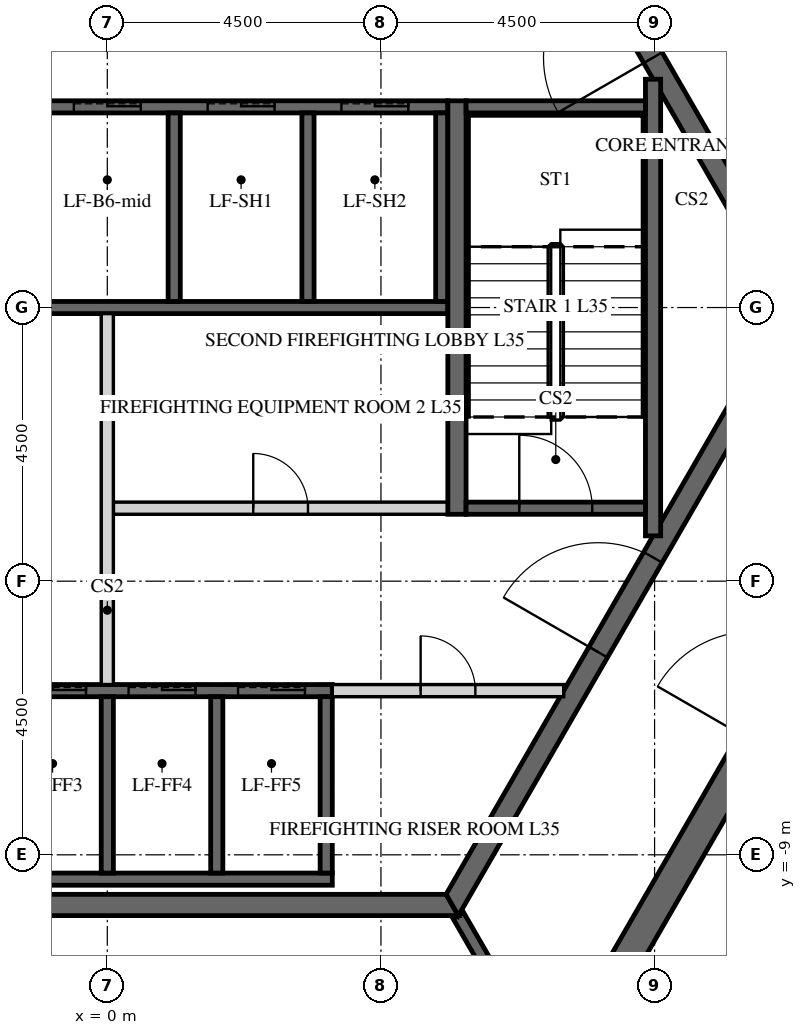
"""IFC4 building model, lengths in metres.
Left out: names, types, materials, properties, quantities, classifications, styles, units other than length and angle.
Written with IfcOpenShell. Run it as: python <this file> out.ifc"""

import sys

from ifc_helpers import new_model, si_unit, direction, frame, frame_2d, origin, place, context, subcontext, project, spatial, polyline, rectangle, outline, extrude, element, fill, save


model = new_model("IFC4")
c1 = context("Model", 3, precision=1e-05, world=origin(), true_north=direction((0.0, 1.0)))
c2 = subcontext(c1, "Body", "Model", "MODEL_VIEW")
j1 = project(units=[si_unit("LENGTHUNIT", "METRE"), si_unit("PLANEANGLEUNIT", "RADIAN")], contexts=[c1])
p1 = place(None, origin())
s1 = spatial("IfcSite", under=j1, at=p1, CompositionType="ELEMENT")
p2 = place(p1, origin())
s2 = spatial("IfcBuilding", under=s1, at=p2, CompositionType="ELEMENT")
p3 = place(p2, frame((0.0, 0.0, 152.7)))
s3 = spatial("IfcBuildingStorey", under=s2, at=p3, CompositionType="ELEMENT", Elevation=152.7)
p4 = place(p3, frame((7.361, -12.75, 0.0), z_axis=(0.0, 0.0, 1.0), x_axis=(0.50000571537, 0.866022103989, 0.0)))
e1 = element("IfcWall", 1, at=p4, inside=s3, PredefinedType="SHEAR", context=c2, shape_type="SweptSolid", body=[
    extrude(outline(polyline([(-0.144, -0.25), (14.867, -0.25), (14.578, 0.25), (0.144, 0.25), (-0.144, -0.25)])), origin(), (0.0, 0.0, 1.0), 3.75),
])
p5 = place(p4, frame((6.49, 0.0, 0.0)))
e2 = element("IfcOpeningElement", 2, at=p5, cuts=e1, PredefinedType="OPENING", context=c2, shape_type="SweptSolid", body=[
    extrude(rectangle(XDim=1.8, YDim=2.4, at=frame_2d((0.9, 1.2))), frame((0.0, 0.26, 0.0), z_axis=(0.0, -1.0, 0.0), x_axis=(1.0, 0.0, 0.0)), (0.0, 0.0, 1.0), 0.52),
])
p6 = place(p3, frame((14.722, 0.0, 0.0), z_axis=(0.0, 0.0, 1.0), x_axis=(-0.50000571537, 0.866022103989, 0.0)))
e3 = element("IfcWall", 3, at=p6, inside=s3, PredefinedType="SHEAR", context=c2, shape_type="SweptSolid", body=[
    extrude(outline(polyline([(-0.144, -0.25), (14.867, -0.25), (14.578, 0.25), (0.144, 0.25), (-0.144, -0.25)])), origin(), (0.0, 0.0, 1.0), 3.75),
])
p7 = place(p6, frame((6.432, 0.0, 0.0)))
e4 = element("IfcOpeningElement", 4, at=p7, cuts=e3, PredefinedType="OPENING", context=c2, shape_type="SweptSolid", body=[
    extrude(rectangle(XDim=1.8, YDim=2.4, at=frame_2d((0.9, 1.2))), frame((0.0, 0.26, 0.0), z_axis=(0.0, -1.0, 0.0), x_axis=(1.0, 0.0, 0.0)), (0.0, 0.0, 1.0), 0.52),
])
p8 = place(p3, frame((-5.673, -9.825, 0.0), z_axis=(0.0, 0.0, 1.0), x_axis=(1.0, 0.0, 0.0)))
e5 = element("IfcWall", 5, at=p8, inside=s3, PredefinedType="SHEAR", context=c2, shape_type="SweptSolid", body=[
    extrude(outline(polyline([(-0.101, -0.175), (11.446, -0.175), (11.244, 0.175), (0.101, 0.175), (-0.101, -0.175)])), origin(), (0.0, 0.0, 1.0), 3.75),
])
p9 = place(p3, frame((5.673, -9.825, 0.0), z_axis=(0.0, 0.0, 1.0), x_axis=(0.499995046907, 0.866028263435, 0.0)))
e6 = element("IfcWall", 6, at=p9, inside=s3, PredefinedType="SHEAR", context=c2, shape_type="SweptSolid", body=[
    extrude(outline(polyline([(-0.101, -0.175), (11.446, -0.175), (11.244, 0.175), (0.101, 0.175), (-0.101, -0.175)])), origin(), (0.0, 0.0, 1.0), 3.75),
])
p10 = place(p9, frame((4.801, 0.0, 0.0)))
e7 = element("IfcOpeningElement", 7, at=p10, cuts=e6, PredefinedType="OPENING", context=c2, shape_type="SweptSolid", body=[
    extrude(rectangle(XDim=1.8, YDim=2.4, at=frame_2d((0.9, 1.2))), frame((0.0, 0.185, 0.0), z_axis=(0.0, -1.0, 0.0), x_axis=(1.0, 0.0, 0.0)), (0.0, 0.0, 1.0), 0.37),
])
p11 = place(p3, frame((11.345, 0.0, 0.0), z_axis=(0.0, 0.0, 1.0), x_axis=(-0.499995046907, 0.866028263435, 0.0)))
e8 = element("IfcWall", 8, at=p11, inside=s3, PredefinedType="SHEAR", context=c2, shape_type="SweptSolid", body=[
    extrude(outline(polyline([(-0.101, -0.175), (11.446, -0.175), (11.244, 0.175), (0.101, 0.175), (-0.101, -0.175)])), origin(), (0.0, 0.0, 1.0), 3.75),
])
p12 = place(p11, frame((4.744, 0.0, 0.0)))
e9 = element("IfcOpeningElement", 9, at=p12, cuts=e8, PredefinedType="OPENING", context=c2, shape_type="SweptSolid", body=[
    extrude(rectangle(XDim=1.8, YDim=2.4, at=frame_2d((0.9, 1.2))), frame((0.0, 0.185, 0.0), z_axis=(0.0, -1.0, 0.0), x_axis=(1.0, 0.0, 0.0)), (0.0, 0.0, 1.0), 0.37),
])
p13 = place(p3, frame((-5.6, 3.3, -0.5), z_axis=(0.0, 0.0, 1.0), x_axis=(1.0, 0.0, 0.0)))
e10 = element("IfcWall", 10, at=p13, inside=s3, PredefinedType="SHEAR", context=c2, shape_type="SweptSolid", body=[
    extrude(rectangle(XDim=11.2, YDim=0.2, at=frame_2d((5.6, 0.0))), origin(), (0.0, 0.0, 1.0), 4.15),
])
p14 = place(p13, frame((0.65, 0.0, 0.5)))
e11 = element("IfcOpeningElement", 11, at=p14, cuts=e10, PredefinedType="OPENING", context=c2, shape_type="SweptSolid", body=[
    extrude(rectangle(XDim=1.1, YDim=2.1, at=frame_2d((0.55, 1.05))), frame((0.0, 0.11, 0.0), z_axis=(0.0, -1.0, 0.0), x_axis=(1.0, 0.0, 0.0)), (0.0, 0.0, 1.0), 0.22),
])
p15 = place(p13, frame((2.85, 0.0, 0.5)))
e12 = element("IfcOpeningElement", 12, at=p15, cuts=e10, PredefinedType="OPENING", context=c2, shape_type="SweptSolid", body=[
    extrude(rectangle(XDim=1.1, YDim=2.1, at=frame_2d((0.55, 1.05))), frame((0.0, 0.11, 0.0), z_axis=(0.0, -1.0, 0.0), x_axis=(1.0, 0.0, 0.0)), (0.0, 0.0, 1.0), 0.22),
])
p16 = place(p13, frame((5.05, 0.0, 0.5)))
e13 = element("IfcOpeningElement", 13, at=p16, cuts=e10, PredefinedType="OPENING", context=c2, shape_type="SweptSolid", body=[
    extrude(rectangle(XDim=1.1, YDim=2.1, at=frame_2d((0.55, 1.05))), frame((0.0, 0.11, 0.0), z_axis=(0.0, -1.0, 0.0), x_axis=(1.0, 0.0, 0.0)), (0.0, 0.0, 1.0), 0.22),
])
p17 = place(p13, frame((7.25, 0.0, 0.5)))
e14 = element("IfcOpeningElement", 14, at=p17, cuts=e10, PredefinedType="OPENING", context=c2, shape_type="SweptSolid", body=[
    extrude(rectangle(XDim=1.1, YDim=2.1, at=frame_2d((0.55, 1.05))), frame((0.0, 0.11, 0.0), z_axis=(0.0, -1.0, 0.0), x_axis=(1.0, 0.0, 0.0)), (0.0, 0.0, 1.0), 0.22),
])
p18 = place(p13, frame((9.45, 0.0, 0.5)))
e15 = element("IfcOpeningElement", 15, at=p18, cuts=e10, PredefinedType="OPENING", context=c2, shape_type="SweptSolid", body=[
    extrude(rectangle(XDim=1.1, YDim=2.1, at=frame_2d((0.55, 1.05))), frame((0.0, 0.11, 0.0), z_axis=(0.0, -1.0, 0.0), x_axis=(1.0, 0.0, 0.0)), (0.0, 0.0, 1.0), 0.22),
])
p19 = place(p3, frame((-5.6, 0.0, -0.5), z_axis=(0.0, 0.0, 1.0), x_axis=(1.0, 0.0, 0.0)))
e16 = element("IfcWall", 16, at=p19, inside=s3, PredefinedType="SHEAR", context=c2, shape_type="SweptSolid", body=[
    extrude(rectangle(XDim=11.2, YDim=0.2, at=frame_2d((5.6, 0.0))), origin(), (0.0, 0.0, 1.0), 4.15),
])
for number, where, z_axis, x_axis in (
    (17, (1.1, 0.1, -0.5), (0.0, 0.0, 1.0), (0.0, 1.0, 0.0)),
    (18, (3.3, 0.1, -0.5), (0.0, 0.0, 1.0), (0.0, 1.0, 0.0)),
    (19, (5.5, 0.1, -0.5), (0.0, 0.0, 1.0), (0.0, 1.0, 0.0)),
):
    element("IfcWall", number, at=place(p3, frame(where, z_axis=z_axis, x_axis=x_axis)), inside=s3, PredefinedType="SHEAR", context=c2, shape_type="SweptSolid", body=[
        extrude(rectangle(XDim=3.1, YDim=0.2, at=frame_2d((1.55, 0.0))), origin(), (0.0, 0.0, 1.0), 4.15),
    ])
p20 = place(p3, frame((-5.5, -6.3, -0.5), z_axis=(0.0, 0.0, 1.0), x_axis=(1.0, 0.0, 0.0)))
e20 = element("IfcWall", 20, at=p20, inside=s3, PredefinedType="SHEAR", context=c2, shape_type="SweptSolid", body=[
    extrude(rectangle(XDim=9.2, YDim=0.2, at=frame_2d((4.6, 0.0))), origin(), (0.0, 0.0, 1.0), 4.15),
])
p21 = place(p20, frame((0.45, 0.0, 0.5)))
e21 = element("IfcOpeningElement", 21, at=p21, cuts=e20, PredefinedType="OPENING", context=c2, shape_type="SweptSolid", body=[
    extrude(rectangle(XDim=1.1, YDim=2.1, at=frame_2d((0.55, 1.05))), frame((0.0, 0.11, 0.0), z_axis=(0.0, -1.0, 0.0), x_axis=(1.0, 0.0, 0.0)), (0.0, 0.0, 1.0), 0.22),
])
p22 = place(p20, frame((2.25, 0.0, 0.5)))
e22 = element("IfcOpeningElement", 22, at=p22, cuts=e20, PredefinedType="OPENING", context=c2, shape_type="SweptSolid", body=[
    extrude(rectangle(XDim=1.1, YDim=2.1, at=frame_2d((0.55, 1.05))), frame((0.0, 0.11, 0.0), z_axis=(0.0, -1.0, 0.0), x_axis=(1.0, 0.0, 0.0)), (0.0, 0.0, 1.0), 0.22),
])
p23 = place(p20, frame((4.05, 0.0, 0.5)))
e23 = element("IfcOpeningElement", 23, at=p23, cuts=e20, PredefinedType="OPENING", context=c2, shape_type="SweptSolid", body=[
    extrude(rectangle(XDim=1.1, YDim=2.1, at=frame_2d((0.55, 1.05))), frame((0.0, 0.11, 0.0), z_axis=(0.0, -1.0, 0.0), x_axis=(1.0, 0.0, 0.0)), (0.0, 0.0, 1.0), 0.22),
])
p24 = place(p20, frame((5.85, 0.0, 0.5)))
e24 = element("IfcOpeningElement", 24, at=p24, cuts=e20, PredefinedType="OPENING", context=c2, shape_type="SweptSolid", body=[
    extrude(rectangle(XDim=1.1, YDim=2.1, at=frame_2d((0.55, 1.05))), frame((0.0, 0.11, 0.0), z_axis=(0.0, -1.0, 0.0), x_axis=(1.0, 0.0, 0.0)), (0.0, 0.0, 1.0), 0.22),
])
p25 = place(p20, frame((7.65, 0.0, 0.5)))
e25 = element("IfcOpeningElement", 25, at=p25, cuts=e20, PredefinedType="OPENING", context=c2, shape_type="SweptSolid", body=[
    extrude(rectangle(XDim=1.1, YDim=2.1, at=frame_2d((0.55, 1.05))), frame((0.0, 0.11, 0.0), z_axis=(0.0, -1.0, 0.0), x_axis=(1.0, 0.0, 0.0)), (0.0, 0.0, 1.0), 0.22),
])
p26 = place(p3, frame((-5.5, -9.4, -0.5), z_axis=(0.0, 0.0, 1.0), x_axis=(1.0, 0.0, 0.0)))
e26 = element("IfcWall", 26, at=p26, inside=s3, PredefinedType="SHEAR", context=c2, shape_type="SweptSolid", body=[
    extrude(rectangle(XDim=9.2, YDim=0.2, at=frame_2d((4.6, 0.0))), origin(), (0.0, 0.0, 1.0), 4.15),
])
for number, where, z_axis, x_axis in (
    (27, (0.0, -9.3, -0.5), (0.0, 0.0, 1.0), (0.0, 1.0, 0.0)),
    (28, (1.8, -9.3, -0.5), (0.0, 0.0, 1.0), (0.0, 1.0, 0.0)),
    (29, (3.6, -9.3, -0.5), (0.0, 0.0, 1.0), (0.0, 1.0, 0.0)),
):
    element("IfcWall", number, at=place(p3, frame(where, z_axis=z_axis, x_axis=x_axis)), inside=s3, PredefinedType="SHEAR", context=c2, shape_type="SweptSolid", body=[
        extrude(rectangle(XDim=2.9, YDim=0.2, at=frame_2d((1.45, 0.0))), origin(), (0.0, 0.0, 1.0), 4.15),
    ])
p27 = place(p3, frame((0.1, -3.3, 0.0), z_axis=(0.0, 0.0, 1.0), x_axis=(1.0, 0.0, 0.0)))
e30 = element("IfcWall", 30, at=p27, inside=s3, PredefinedType="PARTITIONING", context=c2, shape_type="SweptSolid", body=[
    extrude(rectangle(XDim=5.5, YDim=0.2, at=frame_2d((2.75, 0.0))), origin(), (0.0, 0.0, 1.0), 3.65),
])
p28 = place(p27, frame((2.3, 0.0, 0.0)))
e31 = element("IfcOpeningElement", 31, at=p28, cuts=e30, PredefinedType="OPENING", context=c2, shape_type="SweptSolid", body=[
    extrude(rectangle(XDim=0.9, YDim=2.1, at=frame_2d((0.45, 1.05))), frame((0.0, 0.11, 0.0), z_axis=(0.0, -1.0, 0.0), x_axis=(1.0, 0.0, 0.0)), (0.0, 0.0, 1.0), 0.22),
])
p29 = place(p3, frame((0.0, -6.2, 0.0), z_axis=(0.0, 0.0, 1.0), x_axis=(0.0, 1.0, 0.0)))
e32 = element("IfcWall", 32, at=p29, inside=s3, PredefinedType="PARTITIONING", context=c2, shape_type="SweptSolid", body=[
    extrude(rectangle(XDim=6.1, YDim=0.2, at=frame_2d((3.05, 0.0))), origin(), (0.0, 0.0, 1.0), 3.65),
])
p30 = place(p3, frame((3.7, -6.3, 0.0), z_axis=(0.0, 0.0, 1.0), x_axis=(1.0, 0.0, 0.0)))
e33 = element("IfcWall", 33, at=p30, inside=s3, PredefinedType="PARTITIONING", context=c2, shape_type="SweptSolid", body=[
    extrude(rectangle(XDim=3.806, YDim=0.2, at=frame_2d((1.903, 0.0))), origin(), (0.0, 0.0, 1.0), 3.65),
])
p31 = place(p30, frame((1.453, 0.0, 0.0)))
e34 = element("IfcOpeningElement", 34, at=p31, cuts=e33, PredefinedType="OPENING", context=c2, shape_type="SweptSolid", body=[
    extrude(rectangle(XDim=0.9, YDim=2.1, at=frame_2d((0.45, 1.05))), frame((0.0, 0.11, 0.0), z_axis=(0.0, -1.0, 0.0), x_axis=(1.0, 0.0, 0.0)), (0.0, 0.0, 1.0), 0.22),
])
p32 = place(p3, frame((5.773, -10.0, 0.0), z_axis=(0.0, 0.0, 1.0), x_axis=(0.499995765644, -0.866027848477, 0.0)))
e35 = element("IfcWall", 35, at=p32, inside=s3, PredefinedType="SHEAR", context=c2, shape_type="SweptSolid", body=[
    extrude(rectangle(XDim=2.887, YDim=0.2, at=frame_2d((1.443, 0.0))), origin(), (0.0, 0.0, 1.0), 3.75),
])
p33 = place(p3, frame((5.75, -3.4, -0.5), z_axis=(0.0, 0.0, 1.0), x_axis=(0.0, 1.0, 0.0)))
e36 = element("IfcWall", 36, at=p33, inside=s3, PredefinedType="SHEAR", context=c2, shape_type="SweptSolid", body=[
    extrude(rectangle(XDim=6.8, YDim=0.3, at=frame_2d((3.4, 0.0))), origin(), (0.0, 0.0, 1.0), 4.15),
])
p34 = place(p3, frame((8.975, -3.755, -0.5), z_axis=(0.0, 0.0, 1.0), x_axis=(0.0, 1.0, 0.0)))
e37 = element("IfcWall", 37, at=p34, inside=s3, PredefinedType="SHEAR", context=c2, shape_type="SweptSolid", body=[
    extrude(rectangle(XDim=7.51, YDim=0.25, at=frame_2d((3.755, 0.0))), origin(), (0.0, 0.0, 1.0), 4.15),
])
p35 = place(p3, frame((5.9, 3.3, -0.5), z_axis=(0.0, 0.0, 1.0), x_axis=(1.0, 0.0, 0.0)))
e38 = element("IfcWall", 38, at=p35, inside=s3, PredefinedType="SHEAR", context=c2, shape_type="SweptSolid", body=[
    extrude(rectangle(XDim=2.95, YDim=0.2, at=frame_2d((1.475, 0.0))), origin(), (0.0, 0.0, 1.0), 4.15),
])
p36 = place(p3, frame((5.9, -3.3, -0.5), z_axis=(0.0, 0.0, 1.0), x_axis=(1.0, 0.0, 0.0)))
e39 = element("IfcWall", 39, at=p36, inside=s3, PredefinedType="SHEAR", context=c2, shape_type="SweptSolid", body=[
    extrude(rectangle(XDim=2.95, YDim=0.2, at=frame_2d((1.475, 0.0))), origin(), (0.0, 0.0, 1.0), 4.15),
])
p37 = place(p36, frame((0.875, 0.0, 0.5)))
e40 = element("IfcOpeningElement", 40, at=p37, cuts=e39, PredefinedType="OPENING", context=c2, shape_type="SweptSolid", body=[
    extrude(rectangle(XDim=1.2, YDim=2.4, at=frame_2d((0.6, 1.2))), frame((0.0, 0.11, 0.0), z_axis=(0.0, -1.0, 0.0), x_axis=(1.0, 0.0, 0.0)), (0.0, 0.0, 1.0), 0.22),
])
p38 = place(p3, frame((17.046, 0.075, 0.0), z_axis=(0.0, 0.0, 1.0), x_axis=(-0.499999403554, 0.866025748143, 0.0)))
e41 = element("IfcWall", 41, at=p38, inside=s3, PredefinedType="PARTITIONING", context=c2, shape_type="SweptSolid", body=[
    extrude(rectangle(XDim=14.549, YDim=0.15, at=frame_2d((7.275, 0.0))), origin(), (0.0, 0.0, 1.0), 2.823),
])
p39 = place(p38, frame((1.781, 0.0, 0.0)))
e42 = element("IfcOpeningElement", 42, at=p39, cuts=e41, PredefinedType="OPENING", context=c2, shape_type="SweptSolid", body=[
    extrude(rectangle(XDim=1.0, YDim=2.1, at=frame_2d((0.5, 1.05))), frame((0.0, 0.085, 0.0), z_axis=(0.0, -1.0, 0.0), x_axis=(1.0, 0.0, 0.0)), (0.0, 0.0, 1.0), 0.17),
])
p40 = place(p38, frame((8.705, 0.0, 0.0)))
e43 = element("IfcOpeningElement", 43, at=p40, cuts=e41, PredefinedType="OPENING", context=c2, shape_type="SweptSolid", body=[
    extrude(rectangle(XDim=1.0, YDim=2.1, at=frame_2d((0.5, 1.05))), frame((0.0, 0.085, 0.0), z_axis=(0.0, -1.0, 0.0), x_axis=(1.0, 0.0, 0.0)), (0.0, 0.0, 1.0), 0.17),
])
p41 = place(p12, origin())
e44 = element("IfcDoor", 44, at=p41, inside=s3, OperationType="DOUBLE_DOOR_SINGLE_SWING", PredefinedType="DOOR", context=c2, shape_type="SweptSolid", body=[
    extrude(rectangle(XDim=1.8, YDim=2.4, at=frame_2d((0.9, 1.2))), frame((0.0, 0.025, 0.0), z_axis=(0.0, -1.0, 0.0), x_axis=(1.0, 0.0, 0.0)), (0.0, 0.0, 1.0), 0.05),
])
fill(e9, e44)
p42 = place(p10, origin())
e45 = element("IfcDoor", 45, at=p42, inside=s3, OperationType="DOUBLE_DOOR_SINGLE_SWING", PredefinedType="DOOR", context=c2, shape_type="SweptSolid", body=[
    extrude(rectangle(XDim=1.8, YDim=2.4, at=frame_2d((0.9, 1.2))), frame((0.0, 0.025, 0.0), z_axis=(0.0, -1.0, 0.0), x_axis=(1.0, 0.0, 0.0)), (0.0, 0.0, 1.0), 0.05),
])
fill(e7, e45)
p43 = place(p28, origin())
e46 = element("IfcDoor", 46, at=p43, inside=s3, OperationType="SINGLE_SWING_LEFT", PredefinedType="DOOR", context=c2, shape_type="SweptSolid", body=[
    extrude(rectangle(XDim=0.9, YDim=2.1, at=frame_2d((0.45, 1.05))), frame((0.0, 0.025, 0.0), z_axis=(0.0, -1.0, 0.0), x_axis=(1.0, 0.0, 0.0)), (0.0, 0.0, 1.0), 0.05),
])
fill(e31, e46)
p44 = place(p31, origin())
e47 = element("IfcDoor", 47, at=p44, inside=s3, OperationType="SINGLE_SWING_LEFT", PredefinedType="DOOR", context=c2, shape_type="SweptSolid", body=[
    extrude(rectangle(XDim=0.9, YDim=2.1, at=frame_2d((0.45, 1.05))), frame((0.0, 0.025, 0.0), z_axis=(0.0, -1.0, 0.0), x_axis=(1.0, 0.0, 0.0)), (0.0, 0.0, 1.0), 0.05),
])
fill(e34, e47)
p45 = place(p37, origin())
e48 = element("IfcDoor", 48, at=p45, inside=s3, OperationType="SINGLE_SWING_LEFT", PredefinedType="DOOR", context=c2, shape_type="SweptSolid", body=[
    extrude(rectangle(XDim=1.2, YDim=2.4, at=frame_2d((0.6, 1.2))), frame((0.0, 0.025, 0.0), z_axis=(0.0, -1.0, 0.0), x_axis=(1.0, 0.0, 0.0)), (0.0, 0.0, 1.0), 0.05),
])
fill(e40, e48)
p46 = place(p16, origin())
e49 = element("IfcDoor", 49, at=p46, inside=s3, OperationType="SLIDING_TO_LEFT", PredefinedType="DOOR", context=c2, shape_type="SweptSolid", body=[
    extrude(rectangle(XDim=1.1, YDim=2.1, at=frame_2d((0.55, 1.05))), frame((0.0, 0.025, 0.0), z_axis=(0.0, -1.0, 0.0), x_axis=(1.0, 0.0, 0.0)), (0.0, 0.0, 1.0), 0.05),
])
fill(e13, e49)
p47 = place(p17, origin())
e50 = element("IfcDoor", 50, at=p47, inside=s3, OperationType="SLIDING_TO_LEFT", PredefinedType="DOOR", context=c2, shape_type="SweptSolid", body=[
    extrude(rectangle(XDim=1.1, YDim=2.1, at=frame_2d((0.55, 1.05))), frame((0.0, 0.025, 0.0), z_axis=(0.0, -1.0, 0.0), x_axis=(1.0, 0.0, 0.0)), (0.0, 0.0, 1.0), 0.05),
])
fill(e14, e50)
p48 = place(p18, origin())
e51 = element("IfcDoor", 51, at=p48, inside=s3, OperationType="SLIDING_TO_LEFT", PredefinedType="DOOR", context=c2, shape_type="SweptSolid", body=[
    extrude(rectangle(XDim=1.1, YDim=2.1, at=frame_2d((0.55, 1.05))), frame((0.0, 0.025, 0.0), z_axis=(0.0, -1.0, 0.0), x_axis=(1.0, 0.0, 0.0)), (0.0, 0.0, 1.0), 0.05),
])
fill(e15, e51)
p49 = place(p23, origin())
e52 = element("IfcDoor", 52, at=p49, inside=s3, OperationType="SLIDING_TO_LEFT", PredefinedType="DOOR", context=c2, shape_type="SweptSolid", body=[
    extrude(rectangle(XDim=1.1, YDim=2.1, at=frame_2d((0.55, 1.05))), frame((0.0, 0.025, 0.0), z_axis=(0.0, -1.0, 0.0), x_axis=(1.0, 0.0, 0.0)), (0.0, 0.0, 1.0), 0.05),
])
fill(e23, e52)
p50 = place(p24, origin())
e53 = element("IfcDoor", 53, at=p50, inside=s3, OperationType="SLIDING_TO_LEFT", PredefinedType="DOOR", context=c2, shape_type="SweptSolid", body=[
    extrude(rectangle(XDim=1.1, YDim=2.1, at=frame_2d((0.55, 1.05))), frame((0.0, 0.025, 0.0), z_axis=(0.0, -1.0, 0.0), x_axis=(1.0, 0.0, 0.0)), (0.0, 0.0, 1.0), 0.05),
])
fill(e24, e53)
p51 = place(p25, origin())
e54 = element("IfcDoor", 54, at=p51, inside=s3, OperationType="SLIDING_TO_LEFT", PredefinedType="DOOR", context=c2, shape_type="SweptSolid", body=[
    extrude(rectangle(XDim=1.1, YDim=2.1, at=frame_2d((0.55, 1.05))), frame((0.0, 0.025, 0.0), z_axis=(0.0, -1.0, 0.0), x_axis=(1.0, 0.0, 0.0)), (0.0, 0.0, 1.0), 0.05),
])
fill(e25, e54)
save(model, sys.argv[1])
